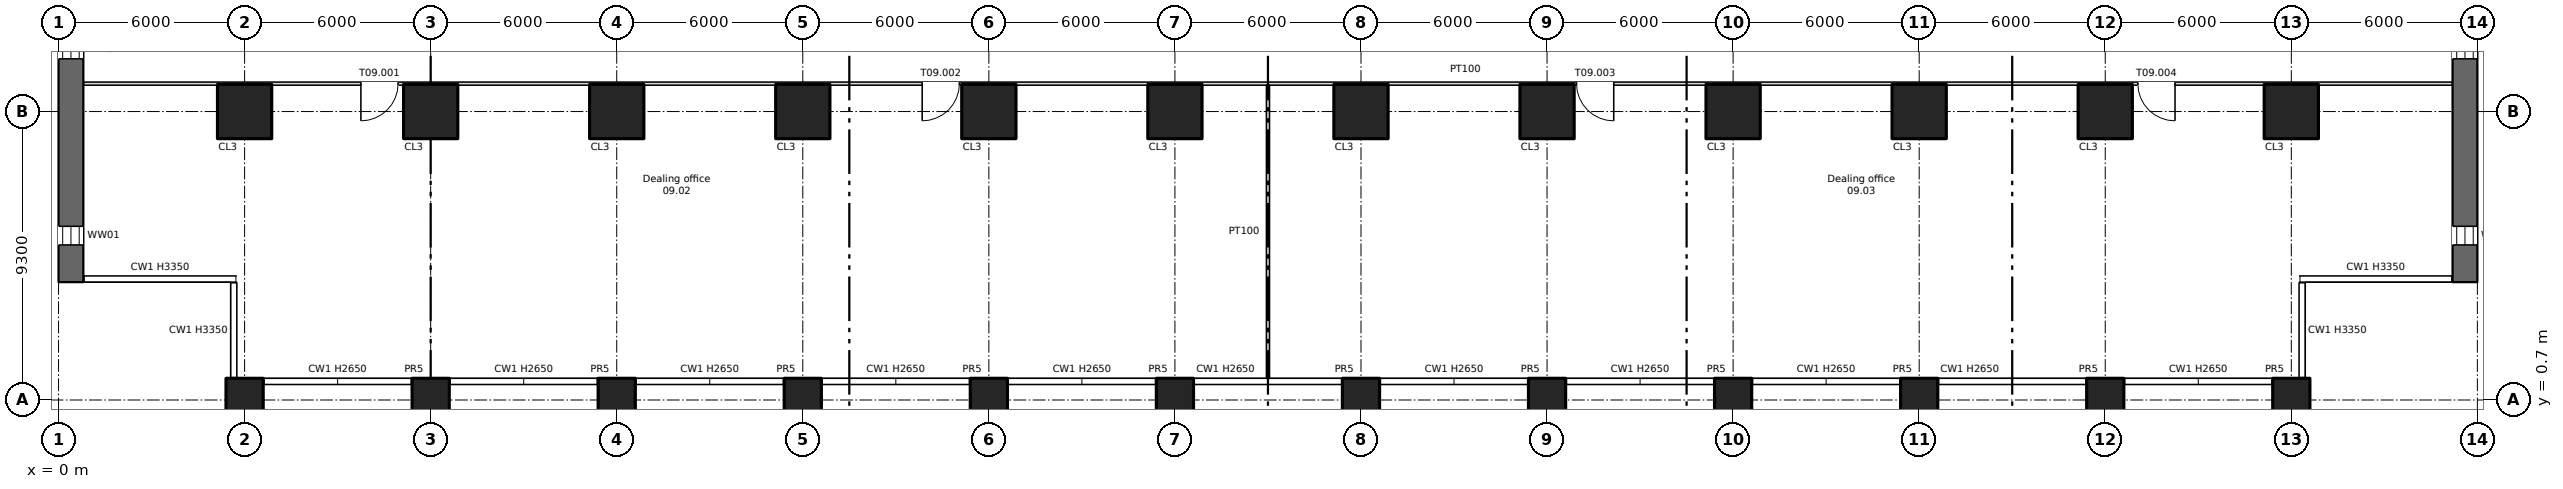
"""IFC4 building model, lengths in metres.
Left out: names, types, materials, properties, quantities, classifications, styles, units other than length and angle.
Written with IfcOpenShell. Run it as: python <this file> out.ifc"""

import sys

from ifc_helpers import new_model, si_unit, direction, frame, frame_2d, origin, origin_2d, place, context, subcontext, project, spatial, rectangle, extrude, element, fill, save


model = new_model("IFC4")
c1 = context("Model", 3, precision=1e-05, world=origin(), true_north=direction((0.0, 1.0)))
c2 = subcontext(c1, "Body", "Model", "MODEL_VIEW")
j1 = project(units=[si_unit("LENGTHUNIT", "METRE"), si_unit("PLANEANGLEUNIT", "RADIAN")], contexts=[c1])
p1 = place(None, origin())
s1 = spatial("IfcSite", under=j1, at=p1, CompositionType="ELEMENT")
p2 = place(p1, origin())
s2 = spatial("IfcBuilding", under=s1, at=p2, CompositionType="ELEMENT")
p3 = place(p2, frame((0.0, 0.0, 41.25)))
s3 = spatial("IfcBuildingStorey", under=s2, at=p3, CompositionType="ELEMENT", Elevation=41.25)
for number, where, z_axis, x_axis in (
    (1, (6.0, 0.7, -0.4), (0.0, 0.0, 1.0), (1.0, 0.0, 0.0)),
    (2, (12.0, 0.7, -0.4), (0.0, 0.0, 1.0), (1.0, 0.0, 0.0)),
    (3, (18.0, 0.7, -0.4), (0.0, 0.0, 1.0), (1.0, 0.0, 0.0)),
    (4, (24.0, 0.7, -0.4), (0.0, 0.0, 1.0), (1.0, 0.0, 0.0)),
    (5, (30.0, 0.7, -0.4), (0.0, 0.0, 1.0), (1.0, 0.0, 0.0)),
    (6, (36.0, 0.7, -0.4), (0.0, 0.0, 1.0), (1.0, 0.0, 0.0)),
    (7, (42.0, 0.7, -0.4), (0.0, 0.0, 1.0), (1.0, 0.0, 0.0)),
    (8, (48.0, 0.7, -0.4), (0.0, 0.0, 1.0), (1.0, 0.0, 0.0)),
    (9, (54.0, 0.7, -0.4), (0.0, 0.0, 1.0), (1.0, 0.0, 0.0)),
    (10, (60.0, 0.7, -0.4), (0.0, 0.0, 1.0), (1.0, 0.0, 0.0)),
    (11, (66.0, 0.7, -0.4), (0.0, 0.0, 1.0), (1.0, 0.0, 0.0)),
    (12, (72.0, 0.7, -0.4), (0.0, 0.0, 1.0), (1.0, 0.0, 0.0)),
):
    element("IfcColumn", number, at=place(p3, frame(where, z_axis=z_axis, x_axis=x_axis)), inside=s3, PredefinedType="COLUMN", context=c2, shape_type="SweptSolid", body=[
        extrude(rectangle(XDim=1.2, YDim=1.4, at=origin_2d()), origin(), (0.0, 0.0, 1.0), 3.75),
    ])
for number, where, z_axis, x_axis in (
    (13, (6.0, 10.0, 0.0), (0.0, 0.0, 1.0), (1.0, 0.0, 0.0)),
    (14, (12.0, 10.0, 0.0), (0.0, 0.0, 1.0), (1.0, 0.0, 0.0)),
    (15, (18.0, 10.0, 0.0), (0.0, 0.0, 1.0), (1.0, 0.0, 0.0)),
    (16, (24.0, 10.0, 0.0), (0.0, 0.0, 1.0), (1.0, 0.0, 0.0)),
    (17, (30.0, 10.0, 0.0), (0.0, 0.0, 1.0), (1.0, 0.0, 0.0)),
    (18, (36.0, 10.0, 0.0), (0.0, 0.0, 1.0), (1.0, 0.0, 0.0)),
    (19, (42.0, 10.0, 0.0), (0.0, 0.0, 1.0), (1.0, 0.0, 0.0)),
    (20, (48.0, 10.0, 0.0), (0.0, 0.0, 1.0), (1.0, 0.0, 0.0)),
    (21, (54.0, 10.0, 0.0), (0.0, 0.0, 1.0), (1.0, 0.0, 0.0)),
    (22, (60.0, 10.0, 0.0), (0.0, 0.0, 1.0), (1.0, 0.0, 0.0)),
    (23, (66.0, 10.0, 0.0), (0.0, 0.0, 1.0), (1.0, 0.0, 0.0)),
    (24, (72.0, 10.0, 0.0), (0.0, 0.0, 1.0), (1.0, 0.0, 0.0)),
):
    element("IfcColumn", number, at=place(p3, frame(where, z_axis=z_axis, x_axis=x_axis)), inside=s3, PredefinedType="COLUMN", context=c2, shape_type="SweptSolid", body=[
        extrude(rectangle(XDim=1.75, YDim=1.75, at=origin_2d()), origin(), (0.0, 0.0, 1.0), 3.35),
    ])
p4 = place(p3, frame((0.4, 4.5, 0.0), z_axis=(0.0, 0.0, 1.0), x_axis=(0.0, 1.0, 0.0)))
e25 = element("IfcWall", 25, at=p4, inside=s3, PredefinedType="SHEAR", context=c2, shape_type="SweptSolid", body=[
    extrude(rectangle(XDim=37.0, YDim=0.8, at=frame_2d((18.5, 0.0))), origin(), (0.0, 0.0, 1.0), 3.35),
])
p5 = place(p4, frame((1.2, 0.0, 0.6)))
e26 = element("IfcOpeningElement", 26, at=p5, cuts=e25, PredefinedType="OPENING", context=c2, shape_type="SweptSolid", body=[
    extrude(rectangle(XDim=0.6, YDim=2.4, at=frame_2d((0.3, 1.2))), frame((0.0, 0.41, 0.0), z_axis=(0.0, -1.0, 0.0), x_axis=(1.0, 0.0, 0.0)), (0.0, 0.0, 1.0), 0.82),
])
p6 = place(p4, frame((7.2, 0.0, 0.6)))
e27 = element("IfcOpeningElement", 27, at=p6, cuts=e25, PredefinedType="OPENING", context=c2, shape_type="SweptSolid", body=[
    extrude(rectangle(XDim=0.6, YDim=2.4, at=frame_2d((0.3, 1.2))), frame((0.0, 0.41, 0.0), z_axis=(0.0, -1.0, 0.0), x_axis=(1.0, 0.0, 0.0)), (0.0, 0.0, 1.0), 0.82),
])
p7 = place(p4, frame((13.2, 0.0, 0.6)))
e28 = element("IfcOpeningElement", 28, at=p7, cuts=e25, PredefinedType="OPENING", context=c2, shape_type="SweptSolid", body=[
    extrude(rectangle(XDim=0.6, YDim=2.4, at=frame_2d((0.3, 1.2))), frame((0.0, 0.41, 0.0), z_axis=(0.0, -1.0, 0.0), x_axis=(1.0, 0.0, 0.0)), (0.0, 0.0, 1.0), 0.82),
])
p8 = place(p4, frame((19.2, 0.0, 0.6)))
e29 = element("IfcOpeningElement", 29, at=p8, cuts=e25, PredefinedType="OPENING", context=c2, shape_type="SweptSolid", body=[
    extrude(rectangle(XDim=0.6, YDim=2.4, at=frame_2d((0.3, 1.2))), frame((0.0, 0.41, 0.0), z_axis=(0.0, -1.0, 0.0), x_axis=(1.0, 0.0, 0.0)), (0.0, 0.0, 1.0), 0.82),
])
p9 = place(p4, frame((25.2, 0.0, 0.6)))
e30 = element("IfcOpeningElement", 30, at=p9, cuts=e25, PredefinedType="OPENING", context=c2, shape_type="SweptSolid", body=[
    extrude(rectangle(XDim=0.6, YDim=2.4, at=frame_2d((0.3, 1.2))), frame((0.0, 0.41, 0.0), z_axis=(0.0, -1.0, 0.0), x_axis=(1.0, 0.0, 0.0)), (0.0, 0.0, 1.0), 0.82),
])
p10 = place(p4, frame((31.2, 0.0, 0.6)))
e31 = element("IfcOpeningElement", 31, at=p10, cuts=e25, PredefinedType="OPENING", context=c2, shape_type="SweptSolid", body=[
    extrude(rectangle(XDim=0.6, YDim=2.4, at=frame_2d((0.3, 1.2))), frame((0.0, 0.41, 0.0), z_axis=(0.0, -1.0, 0.0), x_axis=(1.0, 0.0, 0.0)), (0.0, 0.0, 1.0), 0.82),
])
p11 = place(p3, frame((77.6, 4.5, 0.0), z_axis=(0.0, 0.0, 1.0), x_axis=(0.0, 1.0, 0.0)))
e32 = element("IfcWall", 32, at=p11, inside=s3, PredefinedType="SHEAR", context=c2, shape_type="SweptSolid", body=[
    extrude(rectangle(XDim=37.0, YDim=0.8, at=frame_2d((18.5, 0.0))), origin(), (0.0, 0.0, 1.0), 3.35),
])
p12 = place(p11, frame((1.2, 0.0, 0.6)))
e33 = element("IfcOpeningElement", 33, at=p12, cuts=e32, PredefinedType="OPENING", context=c2, shape_type="SweptSolid", body=[
    extrude(rectangle(XDim=0.6, YDim=2.4, at=frame_2d((0.3, 1.2))), frame((0.0, 0.41, 0.0), z_axis=(0.0, -1.0, 0.0), x_axis=(1.0, 0.0, 0.0)), (0.0, 0.0, 1.0), 0.82),
])
p13 = place(p11, frame((7.2, 0.0, 0.6)))
e34 = element("IfcOpeningElement", 34, at=p13, cuts=e32, PredefinedType="OPENING", context=c2, shape_type="SweptSolid", body=[
    extrude(rectangle(XDim=0.6, YDim=2.4, at=frame_2d((0.3, 1.2))), frame((0.0, 0.41, 0.0), z_axis=(0.0, -1.0, 0.0), x_axis=(1.0, 0.0, 0.0)), (0.0, 0.0, 1.0), 0.82),
])
p14 = place(p11, frame((13.2, 0.0, 0.6)))
e35 = element("IfcOpeningElement", 35, at=p14, cuts=e32, PredefinedType="OPENING", context=c2, shape_type="SweptSolid", body=[
    extrude(rectangle(XDim=0.6, YDim=2.4, at=frame_2d((0.3, 1.2))), frame((0.0, 0.41, 0.0), z_axis=(0.0, -1.0, 0.0), x_axis=(1.0, 0.0, 0.0)), (0.0, 0.0, 1.0), 0.82),
])
p15 = place(p11, frame((19.2, 0.0, 0.6)))
e36 = element("IfcOpeningElement", 36, at=p15, cuts=e32, PredefinedType="OPENING", context=c2, shape_type="SweptSolid", body=[
    extrude(rectangle(XDim=0.6, YDim=2.4, at=frame_2d((0.3, 1.2))), frame((0.0, 0.41, 0.0), z_axis=(0.0, -1.0, 0.0), x_axis=(1.0, 0.0, 0.0)), (0.0, 0.0, 1.0), 0.82),
])
p16 = place(p11, frame((25.2, 0.0, 0.6)))
e37 = element("IfcOpeningElement", 37, at=p16, cuts=e32, PredefinedType="OPENING", context=c2, shape_type="SweptSolid", body=[
    extrude(rectangle(XDim=0.6, YDim=2.4, at=frame_2d((0.3, 1.2))), frame((0.0, 0.41, 0.0), z_axis=(0.0, -1.0, 0.0), x_axis=(1.0, 0.0, 0.0)), (0.0, 0.0, 1.0), 0.82),
])
p17 = place(p11, frame((31.2, 0.0, 0.6)))
e38 = element("IfcOpeningElement", 38, at=p17, cuts=e32, PredefinedType="OPENING", context=c2, shape_type="SweptSolid", body=[
    extrude(rectangle(XDim=0.6, YDim=2.4, at=frame_2d((0.3, 1.2))), frame((0.0, 0.41, 0.0), z_axis=(0.0, -1.0, 0.0), x_axis=(1.0, 0.0, 0.0)), (0.0, 0.0, 1.0), 0.82),
])
p18 = place(p3, frame((0.8, 10.9, 0.0), z_axis=(0.0, 0.0, 1.0), x_axis=(1.0, 0.0, 0.0)))
e39 = element("IfcWall", 39, at=p18, inside=s3, PredefinedType="PARTITIONING", context=c2, shape_type="SweptSolid", body=[
    extrude(rectangle(XDim=76.4, YDim=0.1, at=frame_2d((38.2, 0.0))), origin(), (0.0, 0.0, 1.0), 3.35),
])
p19 = place(p18, frame((8.95, 0.0, 0.0)))
e40 = element("IfcOpeningElement", 40, at=p19, cuts=e39, PredefinedType="OPENING", context=c2, shape_type="SweptSolid", body=[
    extrude(rectangle(XDim=1.2, YDim=2.1, at=frame_2d((0.6, 1.05))), frame((0.0, 0.06, 0.0), z_axis=(0.0, -1.0, 0.0), x_axis=(1.0, 0.0, 0.0)), (0.0, 0.0, 1.0), 0.12),
])
p20 = place(p18, frame((27.05, 0.0, 0.0)))
e41 = element("IfcOpeningElement", 41, at=p20, cuts=e39, PredefinedType="OPENING", context=c2, shape_type="SweptSolid", body=[
    extrude(rectangle(XDim=1.2, YDim=2.1, at=frame_2d((0.6, 1.05))), frame((0.0, 0.06, 0.0), z_axis=(0.0, -1.0, 0.0), x_axis=(1.0, 0.0, 0.0)), (0.0, 0.0, 1.0), 0.12),
])
p21 = place(p18, frame((48.15, 0.0, 0.0)))
e42 = element("IfcOpeningElement", 42, at=p21, cuts=e39, PredefinedType="OPENING", context=c2, shape_type="SweptSolid", body=[
    extrude(rectangle(XDim=1.2, YDim=2.1, at=frame_2d((0.6, 1.05))), frame((0.0, 0.06, 0.0), z_axis=(0.0, -1.0, 0.0), x_axis=(1.0, 0.0, 0.0)), (0.0, 0.0, 1.0), 0.12),
])
p22 = place(p18, frame((66.25, 0.0, 0.0)))
e43 = element("IfcOpeningElement", 43, at=p22, cuts=e39, PredefinedType="OPENING", context=c2, shape_type="SweptSolid", body=[
    extrude(rectangle(XDim=1.2, YDim=2.1, at=frame_2d((0.6, 1.05))), frame((0.0, 0.06, 0.0), z_axis=(0.0, -1.0, 0.0), x_axis=(1.0, 0.0, 0.0)), (0.0, 0.0, 1.0), 0.12),
])
p23 = place(p3, frame((39.0, 1.4, 0.0), z_axis=(0.0, 0.0, 1.0), x_axis=(0.0, 1.0, 0.0)))
e44 = element("IfcWall", 44, at=p23, inside=s3, PredefinedType="PARTITIONING", context=c2, shape_type="SweptSolid", body=[
    extrude(rectangle(XDim=9.45, YDim=0.1, at=frame_2d((4.725, 0.0))), origin(), (0.0, 0.0, 1.0), 3.35),
])
p24 = place(p5, origin())
e45 = element("IfcWindow", 45, at=p24, inside=s3, PartitioningType="SINGLE_PANEL", PredefinedType="WINDOW", context=c2, shape_type="SweptSolid", body=[
    extrude(rectangle(XDim=0.6, YDim=2.4, at=frame_2d((0.3, 1.2))), frame((0.0, 0.03, 0.0), z_axis=(0.0, -1.0, 0.0), x_axis=(1.0, 0.0, 0.0)), (0.0, 0.0, 1.0), 0.06),
])
fill(e26, e45)
p25 = place(p6, origin())
e46 = element("IfcWindow", 46, at=p25, inside=s3, PartitioningType="SINGLE_PANEL", PredefinedType="WINDOW", context=c2, shape_type="SweptSolid", body=[
    extrude(rectangle(XDim=0.6, YDim=2.4, at=frame_2d((0.3, 1.2))), frame((0.0, 0.03, 0.0), z_axis=(0.0, -1.0, 0.0), x_axis=(1.0, 0.0, 0.0)), (0.0, 0.0, 1.0), 0.06),
])
fill(e27, e46)
p26 = place(p12, origin())
e47 = element("IfcWindow", 47, at=p26, inside=s3, PartitioningType="SINGLE_PANEL", PredefinedType="WINDOW", context=c2, shape_type="SweptSolid", body=[
    extrude(rectangle(XDim=0.6, YDim=2.4, at=frame_2d((0.3, 1.2))), frame((0.0, 0.03, 0.0), z_axis=(0.0, -1.0, 0.0), x_axis=(1.0, 0.0, 0.0)), (0.0, 0.0, 1.0), 0.06),
])
fill(e33, e47)
p27 = place(p13, origin())
e48 = element("IfcWindow", 48, at=p27, inside=s3, PartitioningType="SINGLE_PANEL", PredefinedType="WINDOW", context=c2, shape_type="SweptSolid", body=[
    extrude(rectangle(XDim=0.6, YDim=2.4, at=frame_2d((0.3, 1.2))), frame((0.0, 0.03, 0.0), z_axis=(0.0, -1.0, 0.0), x_axis=(1.0, 0.0, 0.0)), (0.0, 0.0, 1.0), 0.06),
])
fill(e34, e48)
p28 = place(p19, origin())
e49 = element("IfcDoor", 49, at=p28, inside=s3, OperationType="SINGLE_SWING_LEFT", PredefinedType="DOOR", context=c2, shape_type="SweptSolid", body=[
    extrude(rectangle(XDim=1.2, YDim=2.1, at=frame_2d((0.6, 1.05))), frame((0.0, 0.025, 0.0), z_axis=(0.0, -1.0, 0.0), x_axis=(1.0, 0.0, 0.0)), (0.0, 0.0, 1.0), 0.05),
])
fill(e40, e49)
p29 = place(p20, origin())
e50 = element("IfcDoor", 50, at=p29, inside=s3, OperationType="SINGLE_SWING_LEFT", PredefinedType="DOOR", context=c2, shape_type="SweptSolid", body=[
    extrude(rectangle(XDim=1.2, YDim=2.1, at=frame_2d((0.6, 1.05))), frame((0.0, 0.025, 0.0), z_axis=(0.0, -1.0, 0.0), x_axis=(1.0, 0.0, 0.0)), (0.0, 0.0, 1.0), 0.05),
])
fill(e41, e50)
p30 = place(p21, origin())
e51 = element("IfcDoor", 51, at=p30, inside=s3, OperationType="SINGLE_SWING_RIGHT", PredefinedType="DOOR", context=c2, shape_type="SweptSolid", body=[
    extrude(rectangle(XDim=1.2, YDim=2.1, at=frame_2d((0.6, 1.05))), frame((0.0, 0.025, 0.0), z_axis=(0.0, -1.0, 0.0), x_axis=(1.0, 0.0, 0.0)), (0.0, 0.0, 1.0), 0.05),
])
fill(e42, e51)
p31 = place(p22, origin())
e52 = element("IfcDoor", 52, at=p31, inside=s3, OperationType="SINGLE_SWING_RIGHT", PredefinedType="DOOR", context=c2, shape_type="SweptSolid", body=[
    extrude(rectangle(XDim=1.2, YDim=2.1, at=frame_2d((0.6, 1.05))), frame((0.0, 0.025, 0.0), z_axis=(0.0, -1.0, 0.0), x_axis=(1.0, 0.0, 0.0)), (0.0, 0.0, 1.0), 0.05),
])
fill(e43, e52)
save(model, sys.argv[1])
